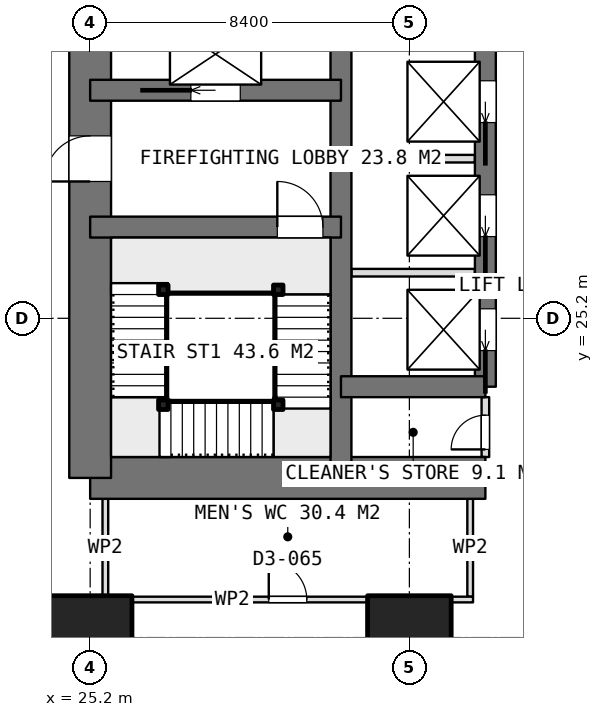
"""IFC4 building model, lengths in metres.
Left out: names, types, materials, properties, quantities, classifications, styles, units other than length and angle.
Written with IfcOpenShell. Run it as: python <this file> out.ifc"""

import sys

from ifc_helpers import new_model, si_unit, direction, frame, frame_2d, origin, origin_2d, place, context, subcontext, project, spatial, rectangle, extrude, element, fill, save


model = new_model("IFC4")
c1 = context("Model", 3, precision=1e-05, world=origin(), true_north=direction((0.0, 1.0)))
c2 = subcontext(c1, "Body", "Model", "MODEL_VIEW")
j1 = project(units=[si_unit("LENGTHUNIT", "METRE"), si_unit("PLANEANGLEUNIT", "RADIAN")], contexts=[c1])
p1 = place(None, origin())
s1 = spatial("IfcSite", under=j1, at=p1, CompositionType="ELEMENT")
p2 = place(p1, origin())
s2 = spatial("IfcBuilding", under=s1, at=p2, CompositionType="ELEMENT")
p3 = place(p2, frame((0.0, 0.0, 59.15)))
s3 = spatial("IfcBuildingStorey", under=s2, at=p3, CompositionType="ELEMENT", Elevation=59.15)
p4 = place(p3, frame((25.2, 21.0, 0.0), z_axis=(0.0, 0.0, 1.0), x_axis=(1.0, 0.0, 0.0)))
e1 = element("IfcWall", 1, at=p4, inside=s3, PredefinedType="SHEAR", context=c2, shape_type="SweptSolid", body=[
    extrude(rectangle(XDim=10.4, YDim=1.1, at=frame_2d((5.2, 0.0))), origin(), (0.0, 0.0, 1.0), 3.75),
])
p5 = place(p3, frame((25.2, 21.0, 0.0), z_axis=(0.0, 0.0, 1.0), x_axis=(0.0, 1.0, 0.0)))
e2 = element("IfcWall", 2, at=p5, inside=s3, PredefinedType="SHEAR", context=c2, shape_type="SweptSolid", body=[
    extrude(rectangle(XDim=25.2, YDim=1.1, at=frame_2d((12.6, 0.0))), origin(), (0.0, 0.0, 1.0), 3.75),
])
p6 = place(p5, frame((7.8, 0.0, 0.0)))
e3 = element("IfcOpeningElement", 3, at=p6, cuts=e2, PredefinedType="OPENING", context=c2, shape_type="SweptSolid", body=[
    extrude(rectangle(XDim=1.2, YDim=2.1, at=frame_2d((0.6, 1.05))), frame((0.0, 0.56, 0.0), z_axis=(0.0, -1.0, 0.0), x_axis=(1.0, 0.0, 0.0)), (0.0, 0.0, 1.0), 1.12),
])
p7 = place(p5, frame((14.25, 0.0, 0.0)))
e4 = element("IfcOpeningElement", 4, at=p7, cuts=e2, PredefinedType="OPENING", context=c2, shape_type="SweptSolid", body=[
    extrude(rectangle(XDim=0.9, YDim=2.1, at=frame_2d((0.45, 1.05))), frame((0.0, 0.56, 0.0), z_axis=(0.0, -1.0, 0.0), x_axis=(1.0, 0.0, 0.0)), (0.0, 0.0, 1.0), 1.12),
])
p8 = place(p5, frame((16.85, 0.0, 0.0)))
e5 = element("IfcOpeningElement", 5, at=p8, cuts=e2, PredefinedType="OPENING", context=c2, shape_type="SweptSolid", body=[
    extrude(rectangle(XDim=0.9, YDim=2.1, at=frame_2d((0.45, 1.05))), frame((0.0, 0.56, 0.0), z_axis=(0.0, -1.0, 0.0), x_axis=(1.0, 0.0, 0.0)), (0.0, 0.0, 1.0), 1.12),
])
p9 = place(p5, frame((19.075, 0.0, 0.0)))
e6 = element("IfcOpeningElement", 6, at=p9, cuts=e2, PredefinedType="OPENING", context=c2, shape_type="SweptSolid", body=[
    extrude(rectangle(XDim=1.2, YDim=2.1, at=frame_2d((0.6, 1.05))), frame((0.0, 0.56, 0.0), z_axis=(0.0, -1.0, 0.0), x_axis=(1.0, 0.0, 0.0)), (0.0, 0.0, 1.0), 1.12),
])
p10 = place(p3, frame((31.8, 21.0, 0.0), z_axis=(0.0, 0.0, 1.0), x_axis=(0.0, 1.0, 0.0)))
e7 = element("IfcWall", 7, at=p10, inside=s3, PredefinedType="SHEAR", context=c2, shape_type="SweptSolid", body=[
    extrude(rectangle(XDim=25.2, YDim=0.55, at=frame_2d((12.6, 0.0))), origin(), (0.0, 0.0, 1.0), 3.75),
])
p11 = place(p3, frame((35.6, 23.4, 0.0), z_axis=(0.0, 0.0, 1.0), x_axis=(0.0, 1.0, 0.0)))
e8 = element("IfcWall", 8, at=p11, inside=s3, PredefinedType="SHEAR", context=c2, shape_type="SweptSolid", body=[
    extrude(rectangle(XDim=18.0, YDim=0.55, at=frame_2d((9.0, 0.0))), origin(), (0.0, 0.0, 1.0), 3.75),
])
p12 = place(p11, frame((0.95, 0.0, 0.0)))
e9 = element("IfcOpeningElement", 9, at=p12, cuts=e8, PredefinedType="OPENING", context=c2, shape_type="SweptSolid", body=[
    extrude(rectangle(XDim=1.1, YDim=2.1, at=frame_2d((0.55, 1.05))), frame((0.0, 0.285, 0.0), z_axis=(0.0, -1.0, 0.0), x_axis=(1.0, 0.0, 0.0)), (0.0, 0.0, 1.0), 0.57),
])
p13 = place(p11, frame((3.95, 0.0, 0.0)))
e10 = element("IfcOpeningElement", 10, at=p13, cuts=e8, PredefinedType="OPENING", context=c2, shape_type="SweptSolid", body=[
    extrude(rectangle(XDim=1.1, YDim=2.1, at=frame_2d((0.55, 1.05))), frame((0.0, 0.285, 0.0), z_axis=(0.0, -1.0, 0.0), x_axis=(1.0, 0.0, 0.0)), (0.0, 0.0, 1.0), 0.57),
])
p14 = place(p11, frame((6.95, 0.0, 0.0)))
e11 = element("IfcOpeningElement", 11, at=p14, cuts=e8, PredefinedType="OPENING", context=c2, shape_type="SweptSolid", body=[
    extrude(rectangle(XDim=1.1, YDim=2.1, at=frame_2d((0.55, 1.05))), frame((0.0, 0.285, 0.0), z_axis=(0.0, -1.0, 0.0), x_axis=(1.0, 0.0, 0.0)), (0.0, 0.0, 1.0), 0.57),
])
p15 = place(p11, frame((9.95, 0.0, 0.0)))
e12 = element("IfcOpeningElement", 12, at=p15, cuts=e8, PredefinedType="OPENING", context=c2, shape_type="SweptSolid", body=[
    extrude(rectangle(XDim=1.1, YDim=2.1, at=frame_2d((0.55, 1.05))), frame((0.0, 0.285, 0.0), z_axis=(0.0, -1.0, 0.0), x_axis=(1.0, 0.0, 0.0)), (0.0, 0.0, 1.0), 0.57),
])
p16 = place(p11, frame((12.95, 0.0, 0.0)))
e13 = element("IfcOpeningElement", 13, at=p16, cuts=e8, PredefinedType="OPENING", context=c2, shape_type="SweptSolid", body=[
    extrude(rectangle(XDim=1.1, YDim=2.1, at=frame_2d((0.55, 1.05))), frame((0.0, 0.285, 0.0), z_axis=(0.0, -1.0, 0.0), x_axis=(1.0, 0.0, 0.0)), (0.0, 0.0, 1.0), 0.57),
])
p17 = place(p11, frame((15.95, 0.0, 0.0)))
e14 = element("IfcOpeningElement", 14, at=p17, cuts=e8, PredefinedType="OPENING", context=c2, shape_type="SweptSolid", body=[
    extrude(rectangle(XDim=1.1, YDim=2.1, at=frame_2d((0.55, 1.05))), frame((0.0, 0.285, 0.0), z_axis=(0.0, -1.0, 0.0), x_axis=(1.0, 0.0, 0.0)), (0.0, 0.0, 1.0), 0.57),
])
p18 = place(p3, frame((31.8, 23.4, 0.0), z_axis=(0.0, 0.0, 1.0), x_axis=(1.0, 0.0, 0.0)))
e15 = element("IfcWall", 15, at=p18, inside=s3, PredefinedType="SHEAR", context=c2, shape_type="SweptSolid", body=[
    extrude(rectangle(XDim=3.8, YDim=0.55, at=frame_2d((1.9, 0.0))), origin(), (0.0, 0.0, 1.0), 3.75),
])
p19 = place(p3, frame((25.2, 27.6, 0.0), z_axis=(0.0, 0.0, 1.0), x_axis=(1.0, 0.0, 0.0)))
e16 = element("IfcWall", 16, at=p19, inside=s3, PredefinedType="SHEAR", context=c2, shape_type="SweptSolid", body=[
    extrude(rectangle(XDim=6.6, YDim=0.55, at=frame_2d((3.3, 0.0))), origin(), (0.0, 0.0, 1.0), 3.75),
])
p20 = place(p19, frame((4.925, 0.0, 0.0)))
e17 = element("IfcOpeningElement", 17, at=p20, cuts=e16, PredefinedType="OPENING", context=c2, shape_type="SweptSolid", body=[
    extrude(rectangle(XDim=1.2, YDim=2.1, at=frame_2d((0.6, 1.05))), frame((0.0, 0.285, 0.0), z_axis=(0.0, -1.0, 0.0), x_axis=(1.0, 0.0, 0.0)), (0.0, 0.0, 1.0), 0.57),
])
p21 = place(p3, frame((25.2, 31.2, 0.0), z_axis=(0.0, 0.0, 1.0), x_axis=(1.0, 0.0, 0.0)))
e18 = element("IfcWall", 18, at=p21, inside=s3, PredefinedType="SHEAR", context=c2, shape_type="SweptSolid", body=[
    extrude(rectangle(XDim=6.6, YDim=0.55, at=frame_2d((3.3, 0.0))), origin(), (0.0, 0.0, 1.0), 3.75),
])
p22 = place(p21, frame((2.65, 0.0, 0.0)))
e19 = element("IfcOpeningElement", 19, at=p22, cuts=e18, PredefinedType="OPENING", context=c2, shape_type="SweptSolid", body=[
    extrude(rectangle(XDim=1.3, YDim=2.1, at=frame_2d((0.65, 1.05))), frame((0.0, 0.285, 0.0), z_axis=(0.0, -1.0, 0.0), x_axis=(1.0, 0.0, 0.0)), (0.0, 0.0, 1.0), 0.57),
])
for number, where, z_axis, x_axis in (
    (20, (25.2, 16.8, 0.0), (0.0, 0.0, 1.0), (1.0, 0.0, 0.0)),
    (21, (33.6, 16.8, 0.0), (0.0, 0.0, 1.0), (1.0, 0.0, 0.0)),
):
    element("IfcColumn", number, at=place(p3, frame(where, z_axis=z_axis, x_axis=x_axis)), inside=s3, PredefinedType="COLUMN", context=c2, shape_type="SweptSolid", body=[
        extrude(rectangle(XDim=2.2, YDim=2.2, at=origin_2d()), origin(), (0.0, 0.0, 1.0), 3.75),
    ])
for number, where, z_axis, x_axis in (
    (22, (32.075, 26.4, 0.0), (0.0, 0.0, 1.0), (1.0, 0.0, 0.0)),
    (23, (32.075, 29.4, 0.0), (0.0, 0.0, 1.0), (1.0, 0.0, 0.0)),
):
    element("IfcWall", number, at=place(p3, frame(where, z_axis=z_axis, x_axis=x_axis)), inside=s3, PredefinedType="PARTITIONING", context=c2, shape_type="SweptSolid", body=[
        extrude(rectangle(XDim=3.25, YDim=0.2, at=frame_2d((1.625, 0.0))), origin(), (0.0, 0.0, 1.0), 3.5),
    ])
p23 = place(p3, frame((35.6, 21.55, 0.0), z_axis=(0.0, 0.0, 1.0), x_axis=(0.0, 1.0, 0.0)))
e24 = element("IfcWall", 24, at=p23, inside=s3, PredefinedType="PARTITIONING", context=c2, shape_type="SweptSolid", body=[
    extrude(rectangle(XDim=1.575, YDim=0.2, at=frame_2d((0.788, 0.0))), origin(), (0.0, 0.0, 1.0), 3.5),
])
p24 = place(p23, frame((0.2, 0.0, 0.0)))
e25 = element("IfcOpeningElement", 25, at=p24, cuts=e24, PredefinedType="OPENING", context=c2, shape_type="SweptSolid", body=[
    extrude(rectangle(XDim=0.9, YDim=2.1, at=frame_2d((0.45, 1.05))), frame((0.0, 0.11, 0.0), z_axis=(0.0, -1.0, 0.0), x_axis=(1.0, 0.0, 0.0)), (0.0, 0.0, 1.0), 0.22),
])
p25 = place(p3, frame((25.525, 17.8, 0.0), z_axis=(0.0, 0.0, 1.0), x_axis=(1.0, 0.0, 0.0)))
e26 = element("IfcWall", 26, at=p25, inside=s3, PredefinedType="PARTITIONING", context=c2, shape_type="SweptSolid", body=[
    extrude(rectangle(XDim=9.75, YDim=0.15, at=frame_2d((4.875, 0.0))), origin(), (0.0, 0.0, 1.0), 3.5),
])
p26 = place(p25, frame((4.375, 0.0, 0.0)))
e27 = element("IfcOpeningElement", 27, at=p26, cuts=e26, PredefinedType="OPENING", context=c2, shape_type="SweptSolid", body=[
    extrude(rectangle(XDim=1.0, YDim=2.1, at=frame_2d((0.5, 1.05))), frame((0.0, 0.085, 0.0), z_axis=(0.0, -1.0, 0.0), x_axis=(1.0, 0.0, 0.0)), (0.0, 0.0, 1.0), 0.17),
])
for number, where, z_axis, x_axis in (
    (28, (25.6, 17.875, 0.0), (0.0, 0.0, 1.0), (0.0, 1.0, 0.0)),
    (29, (35.2, 17.875, 0.0), (0.0, 0.0, 1.0), (0.0, 1.0, 0.0)),
):
    element("IfcWall", number, at=place(p3, frame(where, z_axis=z_axis, x_axis=x_axis)), inside=s3, PredefinedType="PARTITIONING", context=c2, shape_type="SweptSolid", body=[
        extrude(rectangle(XDim=2.575, YDim=0.15, at=frame_2d((1.288, 0.0))), origin(), (0.0, 0.0, 1.0), 3.5),
    ])
for number, where, z_axis, x_axis in (
    (30, (30.15, 25.95, 0.0), (0.0, 0.0, 1.0), (1.0, 0.0, 0.0)),
    (31, (30.15, 22.925, 0.0), (0.0, 0.0, 1.0), (1.0, 0.0, 0.0)),
    (32, (27.125, 22.925, 0.0), (0.0, 0.0, 1.0), (1.0, 0.0, 0.0)),
    (33, (27.125, 25.95, 0.0), (0.0, 0.0, 1.0), (1.0, 0.0, 0.0)),
):
    element("IfcColumn", number, at=place(p3, frame(where, z_axis=z_axis, x_axis=x_axis)), inside=s3, PredefinedType="COLUMN", context=c2, shape_type="SweptSolid", body=[
        extrude(rectangle(XDim=0.25, YDim=0.25, at=origin_2d()), origin(), (0.0, 0.0, 1.0), 3.75),
    ])
p27 = place(p6, origin())
e34 = element("IfcDoor", 34, at=p27, inside=s3, OperationType="SINGLE_SWING_LEFT", PredefinedType="DOOR", context=c2, shape_type="SweptSolid", body=[
    extrude(rectangle(XDim=1.2, YDim=2.1, at=frame_2d((0.6, 1.05))), frame((0.0, 0.025, 0.0), z_axis=(0.0, -1.0, 0.0), x_axis=(1.0, 0.0, 0.0)), (0.0, 0.0, 1.0), 0.05),
])
fill(e3, e34)
p28 = place(p24, origin())
e35 = element("IfcDoor", 35, at=p28, inside=s3, OperationType="SINGLE_SWING_LEFT", PredefinedType="DOOR", context=c2, shape_type="SweptSolid", body=[
    extrude(rectangle(XDim=0.9, YDim=2.1, at=frame_2d((0.45, 1.05))), frame((0.0, 0.025, 0.0), z_axis=(0.0, -1.0, 0.0), x_axis=(1.0, 0.0, 0.0)), (0.0, 0.0, 1.0), 0.05),
])
fill(e25, e35)
p29 = place(p12, origin())
e36 = element("IfcDoor", 36, at=p29, inside=s3, OperationType="SLIDING_TO_LEFT", PredefinedType="USERDEFINED", context=c2, shape_type="SweptSolid", body=[
    extrude(rectangle(XDim=1.1, YDim=2.1, at=frame_2d((0.55, 1.05))), frame((0.0, 0.025, 0.0), z_axis=(0.0, -1.0, 0.0), x_axis=(1.0, 0.0, 0.0)), (0.0, 0.0, 1.0), 0.05),
])
fill(e9, e36)
p30 = place(p13, origin())
e37 = element("IfcDoor", 37, at=p30, inside=s3, OperationType="SLIDING_TO_LEFT", PredefinedType="USERDEFINED", context=c2, shape_type="SweptSolid", body=[
    extrude(rectangle(XDim=1.1, YDim=2.1, at=frame_2d((0.55, 1.05))), frame((0.0, 0.025, 0.0), z_axis=(0.0, -1.0, 0.0), x_axis=(1.0, 0.0, 0.0)), (0.0, 0.0, 1.0), 0.05),
])
fill(e10, e37)
p31 = place(p14, origin())
e38 = element("IfcDoor", 38, at=p31, inside=s3, OperationType="SLIDING_TO_LEFT", PredefinedType="USERDEFINED", context=c2, shape_type="SweptSolid", body=[
    extrude(rectangle(XDim=1.1, YDim=2.1, at=frame_2d((0.55, 1.05))), frame((0.0, 0.025, 0.0), z_axis=(0.0, -1.0, 0.0), x_axis=(1.0, 0.0, 0.0)), (0.0, 0.0, 1.0), 0.05),
])
fill(e11, e38)
p32 = place(p22, origin())
e39 = element("IfcDoor", 39, at=p32, inside=s3, OperationType="SLIDING_TO_LEFT", PredefinedType="USERDEFINED", context=c2, shape_type="SweptSolid", body=[
    extrude(rectangle(XDim=1.3, YDim=2.1, at=frame_2d((0.65, 1.05))), frame((0.0, 0.025, 0.0), z_axis=(0.0, -1.0, 0.0), x_axis=(1.0, 0.0, 0.0)), (0.0, 0.0, 1.0), 0.05),
])
fill(e19, e39)
p33 = place(p26, origin())
e40 = element("IfcDoor", 40, at=p33, inside=s3, OperationType="SINGLE_SWING_LEFT", PredefinedType="DOOR", context=c2, shape_type="SweptSolid", body=[
    extrude(rectangle(XDim=1.0, YDim=2.1, at=frame_2d((0.5, 1.05))), frame((0.0, 0.025, 0.0), z_axis=(0.0, -1.0, 0.0), x_axis=(1.0, 0.0, 0.0)), (0.0, 0.0, 1.0), 0.05),
])
fill(e27, e40)
p34 = place(p20, origin())
e41 = element("IfcDoor", 41, at=p34, inside=s3, OperationType="SINGLE_SWING_RIGHT", PredefinedType="DOOR", context=c2, shape_type="SweptSolid", body=[
    extrude(rectangle(XDim=1.2, YDim=2.1, at=frame_2d((0.6, 1.05))), frame((0.0, 0.025, 0.0), z_axis=(0.0, -1.0, 0.0), x_axis=(1.0, 0.0, 0.0)), (0.0, 0.0, 1.0), 0.05),
])
fill(e17, e41)
save(model, sys.argv[1])
